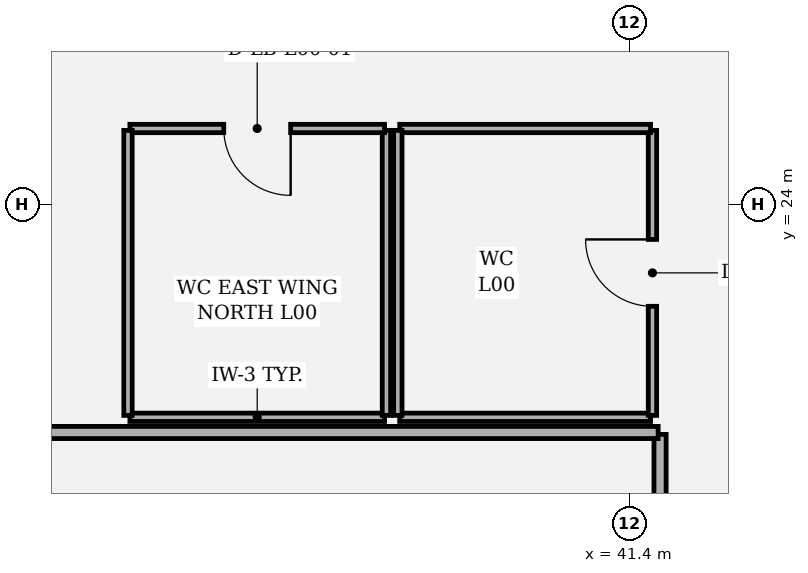
"""IFC4 building model, lengths in metres.
Left out: names, types, materials, properties, quantities, classifications, styles, units other than length and angle.
Written with IfcOpenShell. Run it as: python <this file> out.ifc"""

import sys

from ifc_helpers import new_model, si_unit, direction, frame, frame_2d, origin, place, context, subcontext, project, spatial, rectangle, extrude, element, fill, save


model = new_model("IFC4")
c1 = context("Model", 3, precision=1e-05, world=origin(), true_north=direction((0.0, 1.0)))
c2 = subcontext(c1, "Body", "Model", "MODEL_VIEW")
j1 = project(units=[si_unit("LENGTHUNIT", "METRE"), si_unit("PLANEANGLEUNIT", "RADIAN")], contexts=[c1])
p1 = place(None, origin())
s1 = spatial("IfcSite", under=j1, at=p1, CompositionType="ELEMENT")
p2 = place(p1, origin())
s2 = spatial("IfcBuilding", under=s1, at=p2, CompositionType="ELEMENT")
p3 = place(p2, origin())
s3 = spatial("IfcBuildingStorey", under=s2, at=p3, CompositionType="ELEMENT", Elevation=0.0)
p4 = place(p3, frame((34.825, 21.2, 0.0), z_axis=(0.0, 0.0, 1.0), x_axis=(1.0, 0.0, 0.0)))
e1 = element("IfcWall", 1, at=p4, inside=s3, PredefinedType="PARTITIONING", context=c2, shape_type="SweptSolid", body=[
    extrude(rectangle(XDim=3.35, YDim=0.11, at=frame_2d((1.675, 0.0))), origin(), (0.0, 0.0, 1.0), 6.34),
])
p5 = place(p3, frame((38.2, 21.225, 0.0), z_axis=(0.0, 0.0, 1.0), x_axis=(0.0, 1.0, 0.0)))
e2 = element("IfcWall", 2, at=p5, inside=s3, PredefinedType="PARTITIONING", context=c2, shape_type="SweptSolid", body=[
    extrude(rectangle(XDim=3.75, YDim=0.11, at=frame_2d((1.875, 0.0))), origin(), (0.0, 0.0, 1.0), 6.34),
])
p6 = place(p3, frame((38.175, 25.0, 0.0), z_axis=(0.0, 0.0, 1.0), x_axis=(-1.0, 0.0, 0.0)))
e3 = element("IfcWall", 3, at=p6, inside=s3, PredefinedType="PARTITIONING", context=c2, shape_type="SweptSolid", body=[
    extrude(rectangle(XDim=3.35, YDim=0.11, at=frame_2d((1.675, 0.0))), origin(), (0.0, 0.0, 1.0), 6.34),
])
p7 = place(p6, frame((1.235, 0.0, 0.0)))
e4 = element("IfcOpeningElement", 4, at=p7, cuts=e3, PredefinedType="OPENING", context=c2, shape_type="SweptSolid", body=[
    extrude(rectangle(XDim=0.88, YDim=2.1, at=frame_2d((0.44, 1.05))), frame((0.0, 0.065, 0.0), z_axis=(0.0, -1.0, 0.0), x_axis=(1.0, 0.0, 0.0)), (0.0, 0.0, 1.0), 0.13),
])
p8 = place(p3, frame((34.8, 24.975, 0.0), z_axis=(0.0, 0.0, 1.0), x_axis=(0.0, -1.0, 0.0)))
e5 = element("IfcWall", 5, at=p8, inside=s3, PredefinedType="PARTITIONING", context=c2, shape_type="SweptSolid", body=[
    extrude(rectangle(XDim=3.75, YDim=0.11, at=frame_2d((1.875, 0.0))), origin(), (0.0, 0.0, 1.0), 6.34),
])
p9 = place(p3, frame((38.375, 21.2, 0.0), z_axis=(0.0, 0.0, 1.0), x_axis=(1.0, 0.0, 0.0)))
e6 = element("IfcWall", 6, at=p9, inside=s3, PredefinedType="PARTITIONING", context=c2, shape_type="SweptSolid", body=[
    extrude(rectangle(XDim=3.3, YDim=0.11, at=frame_2d((1.65, 0.0))), origin(), (0.0, 0.0, 1.0), 6.34),
])
p10 = place(p3, frame((41.7, 21.225, 0.0), z_axis=(0.0, 0.0, 1.0), x_axis=(0.0, 1.0, 0.0)))
e7 = element("IfcWall", 7, at=p10, inside=s3, PredefinedType="PARTITIONING", context=c2, shape_type="SweptSolid", body=[
    extrude(rectangle(XDim=3.75, YDim=0.11, at=frame_2d((1.875, 0.0))), origin(), (0.0, 0.0, 1.0), 5.694),
])
p11 = place(p10, frame((1.435, 0.0, 0.0)))
e8 = element("IfcOpeningElement", 8, at=p11, cuts=e7, PredefinedType="OPENING", context=c2, shape_type="SweptSolid", body=[
    extrude(rectangle(XDim=0.88, YDim=2.1, at=frame_2d((0.44, 1.05))), frame((0.0, 0.065, 0.0), z_axis=(0.0, -1.0, 0.0), x_axis=(1.0, 0.0, 0.0)), (0.0, 0.0, 1.0), 0.13),
])
p12 = place(p3, frame((41.675, 25.0, 0.0), z_axis=(0.0, 0.0, 1.0), x_axis=(-1.0, 0.0, 0.0)))
e9 = element("IfcWall", 9, at=p12, inside=s3, PredefinedType="PARTITIONING", context=c2, shape_type="SweptSolid", body=[
    extrude(rectangle(XDim=3.3, YDim=0.11, at=frame_2d((1.65, 0.0))), origin(), (0.0, 0.0, 1.0), 6.34),
])
p13 = place(p3, frame((38.35, 24.975, 0.0), z_axis=(0.0, 0.0, 1.0), x_axis=(0.0, -1.0, 0.0)))
e10 = element("IfcWall", 10, at=p13, inside=s3, PredefinedType="PARTITIONING", context=c2, shape_type="SweptSolid", body=[
    extrude(rectangle(XDim=3.75, YDim=0.11, at=frame_2d((1.875, 0.0))), origin(), (0.0, 0.0, 1.0), 6.34),
])
p14 = place(p3, frame((41.8, 19.875, 0.0), z_axis=(0.0, 0.0, 1.0), x_axis=(0.0, 1.0, 0.0)))
e11 = element("IfcWall", 11, at=p14, inside=s3, PredefinedType="PARTITIONING", context=c2, shape_type="SweptSolid", body=[
    extrude(rectangle(XDim=1.1, YDim=0.16, at=frame_2d((0.55, 0.0))), origin(), (0.0, 0.0, 1.0), 6.34),
])
p15 = place(p3, frame((41.775, 21.0, 0.0), z_axis=(0.0, 0.0, 1.0), x_axis=(-1.0, 0.0, 0.0)))
e12 = element("IfcWall", 12, at=p15, inside=s3, PredefinedType="PARTITIONING", context=c2, shape_type="SweptSolid", body=[
    extrude(rectangle(XDim=9.295, YDim=0.16, at=frame_2d((4.647, 0.0))), origin(), (0.0, 0.0, 1.0), 6.34),
])
p16 = place(p7, origin())
e13 = element("IfcDoor", 13, at=p16, inside=s3, OperationType="SINGLE_SWING_LEFT", PredefinedType="DOOR", context=c2, shape_type="SweptSolid", body=[
    extrude(rectangle(XDim=0.88, YDim=2.1, at=frame_2d((0.44, 1.05))), frame((0.0, 0.025, 0.0), z_axis=(0.0, -1.0, 0.0), x_axis=(1.0, 0.0, 0.0)), (0.0, 0.0, 1.0), 0.05),
])
fill(e4, e13)
p17 = place(p11, origin())
e14 = element("IfcDoor", 14, at=p17, inside=s3, OperationType="SINGLE_SWING_RIGHT", PredefinedType="DOOR", context=c2, shape_type="SweptSolid", body=[
    extrude(rectangle(XDim=0.88, YDim=2.1, at=frame_2d((0.44, 1.05))), frame((0.0, 0.025, 0.0), z_axis=(0.0, -1.0, 0.0), x_axis=(1.0, 0.0, 0.0)), (0.0, 0.0, 1.0), 0.05),
])
fill(e8, e14)
save(model, sys.argv[1])
